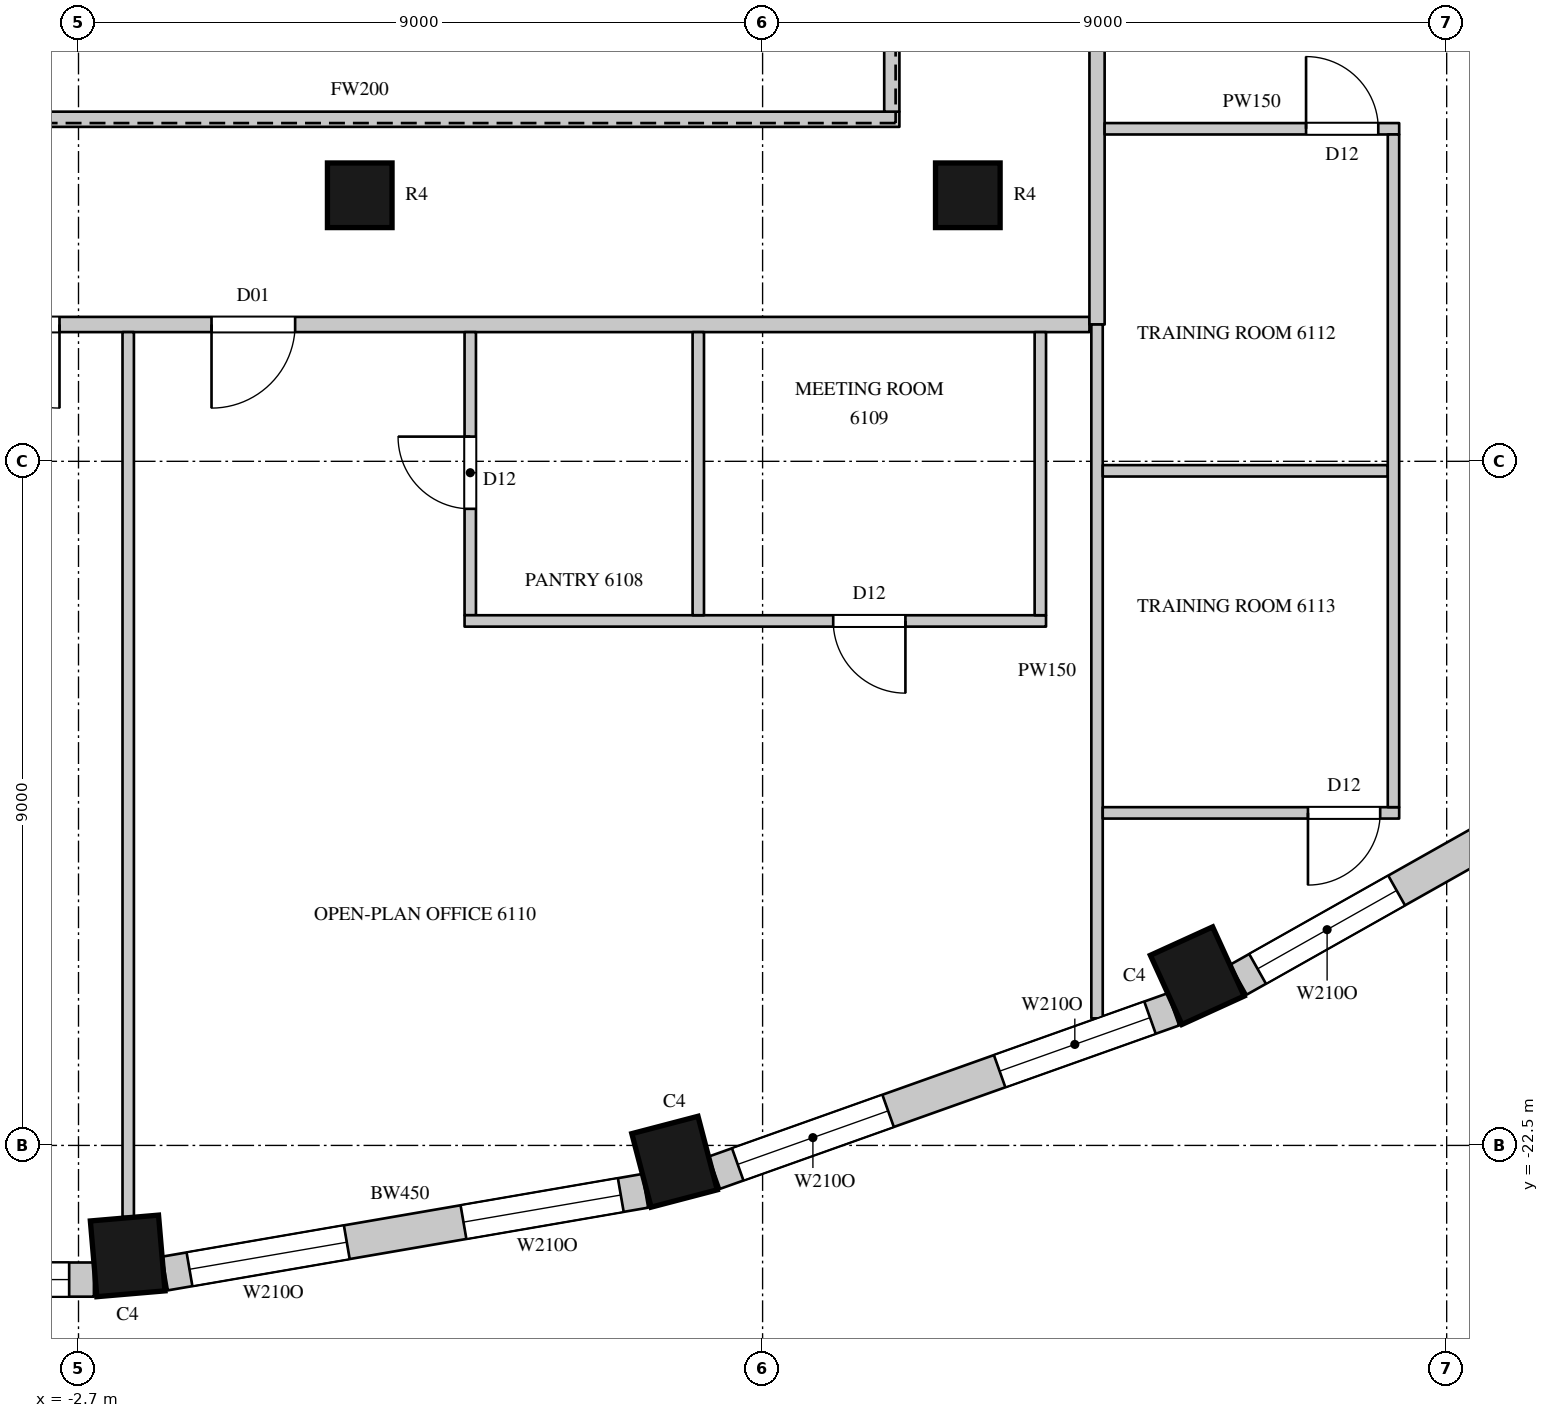
"""IFC4 building model, lengths in metres.
Left out: names, types, materials, properties, quantities, classifications, styles, units other than length and angle.
Written with IfcOpenShell. Run it as: python <this file> out.ifc"""

import sys

from ifc_helpers import new_model, si_unit, direction, frame, frame_2d, origin, origin_2d, place, context, subcontext, project, spatial, rectangle, circle, extrude, element, fill, save


model = new_model("IFC4")
c1 = context("Model", 3, precision=1e-05, world=origin(), true_north=direction((0.0, 1.0)))
c2 = subcontext(c1, "Body", "Model", "MODEL_VIEW")
j1 = project(units=[si_unit("LENGTHUNIT", "METRE"), si_unit("PLANEANGLEUNIT", "RADIAN")], contexts=[c1])
p1 = place(None, origin())
s1 = spatial("IfcSite", under=j1, at=p1, CompositionType="ELEMENT")
p2 = place(p1, origin())
s2 = spatial("IfcBuilding", under=s1, at=p2, CompositionType="ELEMENT")
p3 = place(p2, frame((0.0, 0.0, 272.1)))
s3 = spatial("IfcBuildingStorey", under=s2, at=p3, CompositionType="ELEMENT", Elevation=272.1)
for number, where, z_axis, x_axis in (
    (1, (-2.053, -23.954, 0.0), (0.0, 0.0, 1.0), (0.996, 0.085, 0.0)),
    (2, (5.142, -22.715, 0.0), (0.0, 0.0, 1.0), (0.967, 0.253, 0.0)),
    (3, (12.019, -20.267, 0.0), (0.0, 0.0, 1.0), (0.91, 0.415, 0.0)),
):
    element("IfcColumn", number, at=place(p3, frame(where, z_axis=z_axis, x_axis=x_axis)), inside=s3, PredefinedType="COLUMN", context=c2, shape_type="SweptSolid", body=[
        extrude(rectangle(XDim=0.9, YDim=1.0, at=origin_2d()), origin(), (0.0, 0.0, 1.0), 4.1),
    ])
for number, where, z_axis, x_axis in (
    (4, (1.0, -10.0, 0.0), (0.0, 0.0, 1.0), (1.0, 0.0, 0.0)),
    (5, (9.0, -10.0, 0.0), (0.0, 0.0, 1.0), (1.0, 0.0, 0.0)),
):
    element("IfcColumn", number, at=place(p3, frame(where, z_axis=z_axis, x_axis=x_axis)), inside=s3, PredefinedType="COLUMN", context=c2, shape_type="SweptSolid", body=[
        extrude(circle(Radius=0.425, at=origin_2d()), origin(), (0.0, 0.0, 1.0), 4.1),
    ])
p4 = place(p3, frame((-8.903, -24.265, 0.0), z_axis=(0.0, 0.0, 1.0), x_axis=(1.0, 0.0, 0.0)))
e6 = element("IfcWall", 6, at=p4, inside=s3, PredefinedType="SOLIDWALL", context=c2, shape_type="SweptSolid", body=[
    extrude(rectangle(XDim=6.406, YDim=0.45, at=frame_2d((3.203, 0.0))), origin(), (0.0, 0.0, 1.0), 3.8),
])
p5 = place(p4, frame((3.98, 0.0, 1.05)))
e7 = element("IfcOpeningElement", 7, at=p5, cuts=e6, PredefinedType="OPENING", context=c2, shape_type="SweptSolid", body=[
    extrude(rectangle(XDim=2.1, YDim=2.4, at=frame_2d((1.05, 1.2))), frame((0.0, 0.235, 0.0), z_axis=(0.0, -1.0, 0.0), x_axis=(1.0, 0.0, 0.0)), (0.0, 0.0, 1.0), 0.47),
])
p6 = place(p4, frame((1.214, 0.0, 1.05)))
e8 = element("IfcOpeningElement", 8, at=p6, cuts=e6, PredefinedType="OPENING", context=c2, shape_type="SweptSolid", body=[
    extrude(rectangle(XDim=1.2, YDim=2.4, at=frame_2d((0.6, 1.2))), frame((0.0, 0.235, 0.0), z_axis=(0.0, -1.0, 0.0), x_axis=(1.0, 0.0, 0.0)), (0.0, 0.0, 1.0), 0.47),
])
p7 = place(p3, frame((-1.562, -24.185, 0.0), z_axis=(0.0, 0.0, 1.0), x_axis=(0.985502073964, 0.169663379113, 0.0)))
e9 = element("IfcWall", 9, at=p7, inside=s3, PredefinedType="SOLIDWALL", context=c2, shape_type="SweptSolid", body=[
    extrude(rectangle(XDim=6.412, YDim=0.45, at=frame_2d((3.206, 0.0))), origin(), (0.0, 0.0, 1.0), 3.8),
])
p8 = place(p7, frame((0.327, 0.0, 1.05)))
e10 = element("IfcOpeningElement", 10, at=p8, cuts=e9, PredefinedType="OPENING", context=c2, shape_type="SweptSolid", body=[
    extrude(rectangle(XDim=2.1, YDim=2.4, at=frame_2d((1.05, 1.2))), frame((0.0, 0.235, 0.0), z_axis=(0.0, -1.0, 0.0), x_axis=(1.0, 0.0, 0.0)), (0.0, 0.0, 1.0), 0.47),
])
p9 = place(p7, frame((3.985, 0.0, 1.05)))
e11 = element("IfcOpeningElement", 11, at=p9, cuts=e9, PredefinedType="OPENING", context=c2, shape_type="SweptSolid", body=[
    extrude(rectangle(XDim=2.1, YDim=2.4, at=frame_2d((1.05, 1.2))), frame((0.0, 0.235, 0.0), z_axis=(0.0, -1.0, 0.0), x_axis=(1.0, 0.0, 0.0)), (0.0, 0.0, 1.0), 0.47),
])
p10 = place(p3, frame((5.665, -22.859, 0.0), z_axis=(0.0, 0.0, 1.0), x_axis=(0.942108340262, 0.335308626803, 0.0)))
e12 = element("IfcWall", 12, at=p10, inside=s3, PredefinedType="SOLIDWALL", context=c2, shape_type="SweptSolid", body=[
    extrude(rectangle(XDim=6.412, YDim=0.45, at=frame_2d((3.206, 0.0))), origin(), (0.0, 0.0, 1.0), 3.8),
])
p11 = place(p10, frame((0.327, 0.0, 1.05)))
e13 = element("IfcOpeningElement", 13, at=p11, cuts=e12, PredefinedType="OPENING", context=c2, shape_type="SweptSolid", body=[
    extrude(rectangle(XDim=2.1, YDim=2.4, at=frame_2d((1.05, 1.2))), frame((0.0, 0.235, 0.0), z_axis=(0.0, -1.0, 0.0), x_axis=(1.0, 0.0, 0.0)), (0.0, 0.0, 1.0), 0.47),
])
p12 = place(p10, frame((3.985, 0.0, 1.05)))
e14 = element("IfcOpeningElement", 14, at=p12, cuts=e12, PredefinedType="OPENING", context=c2, shape_type="SweptSolid", body=[
    extrude(rectangle(XDim=2.1, YDim=2.4, at=frame_2d((1.05, 1.2))), frame((0.0, 0.235, 0.0), z_axis=(0.0, -1.0, 0.0), x_axis=(1.0, 0.0, 0.0)), (0.0, 0.0, 1.0), 0.47),
])
p13 = place(p3, frame((12.559, -20.32, 0.0), z_axis=(0.0, 0.0, 1.0), x_axis=(0.871065783524, 0.491166367714, 0.0)))
e15 = element("IfcWall", 15, at=p13, inside=s3, PredefinedType="SOLIDWALL", context=c2, shape_type="SweptSolid", body=[
    extrude(rectangle(XDim=6.196, YDim=0.45, at=frame_2d((3.098, 0.0))), origin(), (0.0, 0.0, 1.0), 3.8),
])
p14 = place(p13, frame((0.291, 0.0, 1.05)))
e16 = element("IfcOpeningElement", 16, at=p14, cuts=e15, PredefinedType="OPENING", context=c2, shape_type="SweptSolid", body=[
    extrude(rectangle(XDim=2.1, YDim=2.4, at=frame_2d((1.05, 1.2))), frame((0.0, 0.235, 0.0), z_axis=(0.0, -1.0, 0.0), x_axis=(1.0, 0.0, 0.0)), (0.0, 0.0, 1.0), 0.47),
])
p15 = place(p13, frame((3.875, 0.0, 1.05)))
e17 = element("IfcOpeningElement", 17, at=p15, cuts=e15, PredefinedType="OPENING", context=c2, shape_type="SweptSolid", body=[
    extrude(rectangle(XDim=2.1, YDim=2.4, at=frame_2d((1.05, 1.2))), frame((0.0, 0.235, 0.0), z_axis=(0.0, -1.0, 0.0), x_axis=(1.0, 0.0, 0.0)), (0.0, 0.0, 1.0), 0.47),
])
p16 = place(p3, frame((-10.9, -11.7, 0.0), z_axis=(0.0, 0.0, 1.0), x_axis=(1.0, 0.0, 0.0)))
e18 = element("IfcWall", 18, at=p16, inside=s3, PredefinedType="PARTITIONING", context=c2, shape_type="SweptSolid", body=[
    extrude(rectangle(XDim=21.5, YDim=0.2, at=frame_2d((10.75, 0.0))), origin(), (0.0, 0.0, 1.0), 3.8),
])
p17 = place(p16, frame((0.95, 0.0, 0.0)))
e19 = element("IfcOpeningElement", 19, at=p17, cuts=e18, PredefinedType="OPENING", context=c2, shape_type="SweptSolid", body=[
    extrude(rectangle(XDim=0.95, YDim=2.2, at=frame_2d((0.475, 1.1))), frame((0.0, 0.11, 0.0), z_axis=(0.0, -1.0, 0.0), x_axis=(1.0, 0.0, 0.0)), (0.0, 0.0, 1.0), 0.22),
])
p18 = place(p16, frame((4.2, 0.0, 0.0)))
e20 = element("IfcOpeningElement", 20, at=p18, cuts=e18, PredefinedType="OPENING", context=c2, shape_type="SweptSolid", body=[
    extrude(rectangle(XDim=0.9, YDim=2.2, at=frame_2d((0.45, 1.1))), frame((0.0, 0.11, 0.0), z_axis=(0.0, -1.0, 0.0), x_axis=(1.0, 0.0, 0.0)), (0.0, 0.0, 1.0), 0.22),
])
p19 = place(p16, frame((6.85, 0.0, 0.0)))
e21 = element("IfcOpeningElement", 21, at=p19, cuts=e18, PredefinedType="OPENING", context=c2, shape_type="SweptSolid", body=[
    extrude(rectangle(XDim=1.1, YDim=2.4, at=frame_2d((0.55, 1.2))), frame((0.0, 0.11, 0.0), z_axis=(0.0, -1.0, 0.0), x_axis=(1.0, 0.0, 0.0)), (0.0, 0.0, 1.0), 0.22),
])
p20 = place(p16, frame((9.95, 0.0, 0.0)))
e22 = element("IfcOpeningElement", 22, at=p20, cuts=e18, PredefinedType="OPENING", context=c2, shape_type="SweptSolid", body=[
    extrude(rectangle(XDim=1.1, YDim=2.4, at=frame_2d((0.55, 1.2))), frame((0.0, 0.11, 0.0), z_axis=(0.0, -1.0, 0.0), x_axis=(1.0, 0.0, 0.0)), (0.0, 0.0, 1.0), 0.22),
])
p21 = place(p3, frame((-6.1, -9.0, 0.0), z_axis=(0.0, 0.0, 1.0), x_axis=(1.0, 0.0, 0.0)))
e23 = element("IfcWall", 23, at=p21, inside=s3, PredefinedType="PARTITIONING", context=c2, shape_type="SweptSolid", body=[
    extrude(rectangle(XDim=14.2, YDim=0.2, at=frame_2d((7.1, 0.0))), origin(), (0.0, 0.0, 1.0), 3.8),
])
p22 = place(p3, frame((8.0, -8.9, 0.0), z_axis=(0.0, 0.0, 1.0), x_axis=(0.0, 1.0, 0.0)))
e24 = element("IfcWall", 24, at=p22, inside=s3, PredefinedType="PARTITIONING", context=c2, shape_type="SweptSolid", body=[
    extrude(rectangle(XDim=4.38, YDim=0.2, at=frame_2d((2.19, 0.0))), origin(), (0.0, 0.0, 1.0), 3.8),
])
p23 = place(p3, frame((10.7, -11.7, 0.0), z_axis=(0.0, 0.0, 1.0), x_axis=(0.0, 1.0, 0.0)))
e25 = element("IfcWall", 25, at=p23, inside=s3, PredefinedType="PARTITIONING", context=c2, shape_type="SweptSolid", body=[
    extrude(rectangle(XDim=23.8, YDim=0.2, at=frame_2d((11.9, 0.0))), origin(), (0.0, 0.0, 1.0), 3.8),
])
p24 = place(p23, frame((12.35, 0.0, 0.0)))
e26 = element("IfcOpeningElement", 26, at=p24, cuts=e25, PredefinedType="OPENING", context=c2, shape_type="SweptSolid", body=[
    extrude(rectangle(XDim=1.5, YDim=2.4, at=frame_2d((0.75, 1.2))), frame((0.0, 0.11, 0.0), z_axis=(0.0, -1.0, 0.0), x_axis=(1.0, 0.0, 0.0)), (0.0, 0.0, 1.0), 0.22),
])
p25 = place(p23, frame((19.55, 0.0, 0.0)))
e27 = element("IfcOpeningElement", 27, at=p25, cuts=e25, PredefinedType="OPENING", context=c2, shape_type="SweptSolid", body=[
    extrude(rectangle(XDim=1.1, YDim=2.4, at=frame_2d((0.55, 1.2))), frame((0.0, 0.11, 0.0), z_axis=(0.0, -1.0, 0.0), x_axis=(1.0, 0.0, 0.0)), (0.0, 0.0, 1.0), 0.22),
])
p26 = place(p23, frame((4.25, 0.0, 0.0)))
e28 = element("IfcOpeningElement", 28, at=p26, cuts=e25, PredefinedType="OPENING", context=c2, shape_type="SweptSolid", body=[
    extrude(rectangle(XDim=1.1, YDim=2.4, at=frame_2d((0.55, 1.2))), frame((0.0, 0.11, 0.0), z_axis=(0.0, -1.0, 0.0), x_axis=(1.0, 0.0, 0.0)), (0.0, 0.0, 1.0), 0.22),
])
p27 = place(p3, frame((-2.046, -23.441, 0.0), z_axis=(0.0, 0.0, 1.0), x_axis=(0.0, 1.0, 0.0)))
e29 = element("IfcWall", 29, at=p27, inside=s3, PredefinedType="PARTITIONING", context=c2, shape_type="SweptSolid", body=[
    extrude(rectangle(XDim=11.641, YDim=0.15, at=frame_2d((5.821, 0.0))), origin(), (0.0, 0.0, 1.0), 3.8),
])
p28 = place(p3, frame((2.454, -15.525, 0.0), z_axis=(0.0, 0.0, 1.0), x_axis=(0.0, 1.0, 0.0)))
e30 = element("IfcWall", 30, at=p28, inside=s3, PredefinedType="PARTITIONING", context=c2, shape_type="SweptSolid", body=[
    extrude(rectangle(XDim=3.725, YDim=0.15, at=frame_2d((1.862, 0.0))), origin(), (0.0, 0.0, 1.0), 3.8),
])
p29 = place(p28, frame((1.4, 0.0, 0.0)))
e31 = element("IfcOpeningElement", 31, at=p29, cuts=e30, PredefinedType="OPENING", context=c2, shape_type="SweptSolid", body=[
    extrude(rectangle(XDim=0.95, YDim=2.2, at=frame_2d((0.475, 1.1))), frame((0.0, 0.085, 0.0), z_axis=(0.0, -1.0, 0.0), x_axis=(1.0, 0.0, 0.0)), (0.0, 0.0, 1.0), 0.17),
])
p30 = place(p3, frame((2.379, -15.6, 0.0), z_axis=(0.0, 0.0, 1.0), x_axis=(1.0, 0.0, 0.0)))
e32 = element("IfcWall", 32, at=p30, inside=s3, PredefinedType="PARTITIONING", context=c2, shape_type="SweptSolid", body=[
    extrude(rectangle(XDim=7.65, YDim=0.15, at=frame_2d((3.825, 0.0))), origin(), (0.0, 0.0, 1.0), 3.8),
])
p31 = place(p30, frame((4.85, 0.0, 0.0)))
e33 = element("IfcOpeningElement", 33, at=p31, cuts=e32, PredefinedType="OPENING", context=c2, shape_type="SweptSolid", body=[
    extrude(rectangle(XDim=0.95, YDim=2.2, at=frame_2d((0.475, 1.1))), frame((0.0, 0.085, 0.0), z_axis=(0.0, -1.0, 0.0), x_axis=(1.0, 0.0, 0.0)), (0.0, 0.0, 1.0), 0.17),
])
for number, where, z_axis, x_axis in (
    (34, (5.454, -15.525, 0.0), (0.0, 0.0, 1.0), (0.0, 1.0, 0.0)),
    (35, (9.954, -15.525, 0.0), (0.0, 0.0, 1.0), (0.0, 1.0, 0.0)),
):
    element("IfcWall", number, at=place(p3, frame(where, z_axis=z_axis, x_axis=x_axis)), inside=s3, PredefinedType="PARTITIONING", context=c2, shape_type="SweptSolid", body=[
        extrude(rectangle(XDim=3.725, YDim=0.15, at=frame_2d((1.862, 0.0))), origin(), (0.0, 0.0, 1.0), 3.8),
    ])
p32 = place(p3, frame((10.7, -20.828, 0.0), z_axis=(0.0, 0.0, 1.0), x_axis=(0.0, 1.0, 0.0)))
e36 = element("IfcWall", 36, at=p32, inside=s3, PredefinedType="PARTITIONING", context=c2, shape_type="SweptSolid", body=[
    extrude(rectangle(XDim=9.128, YDim=0.15, at=frame_2d((4.564, 0.0))), origin(), (0.0, 0.0, 1.0), 3.8),
])
p33 = place(p3, frame((10.775, -18.125, 0.0), z_axis=(0.0, 0.0, 1.0), x_axis=(1.0, 0.0, 0.0)))
e37 = element("IfcWall", 37, at=p33, inside=s3, PredefinedType="PARTITIONING", context=c2, shape_type="SweptSolid", body=[
    extrude(rectangle(XDim=3.9, YDim=0.15, at=frame_2d((1.95, 0.0))), origin(), (0.0, 0.0, 1.0), 3.8),
])
p34 = place(p33, frame((2.7, 0.0, 0.0)))
e38 = element("IfcOpeningElement", 38, at=p34, cuts=e37, PredefinedType="OPENING", context=c2, shape_type="SweptSolid", body=[
    extrude(rectangle(XDim=0.95, YDim=2.2, at=frame_2d((0.475, 1.1))), frame((0.0, 0.085, 0.0), z_axis=(0.0, -1.0, 0.0), x_axis=(1.0, 0.0, 0.0)), (0.0, 0.0, 1.0), 0.17),
])
p35 = place(p3, frame((10.775, -13.625, 0.0), z_axis=(0.0, 0.0, 1.0), x_axis=(1.0, 0.0, 0.0)))
e39 = element("IfcWall", 39, at=p35, inside=s3, PredefinedType="PARTITIONING", context=c2, shape_type="SweptSolid", body=[
    extrude(rectangle(XDim=3.75, YDim=0.15, at=frame_2d((1.875, 0.0))), origin(), (0.0, 0.0, 1.0), 3.8),
])
p36 = place(p3, frame((10.8, -9.125, 0.0), z_axis=(0.0, 0.0, 1.0), x_axis=(1.0, 0.0, 0.0)))
e40 = element("IfcWall", 40, at=p36, inside=s3, PredefinedType="PARTITIONING", context=c2, shape_type="SweptSolid", body=[
    extrude(rectangle(XDim=3.875, YDim=0.15, at=frame_2d((1.938, 0.0))), origin(), (0.0, 0.0, 1.0), 3.8),
])
p37 = place(p36, frame((2.65, 0.0, 0.0)))
e41 = element("IfcOpeningElement", 41, at=p37, cuts=e40, PredefinedType="OPENING", context=c2, shape_type="SweptSolid", body=[
    extrude(rectangle(XDim=0.95, YDim=2.2, at=frame_2d((0.475, 1.1))), frame((0.0, 0.085, 0.0), z_axis=(0.0, -1.0, 0.0), x_axis=(1.0, 0.0, 0.0)), (0.0, 0.0, 1.0), 0.17),
])
p38 = place(p3, frame((14.6, -18.05, 0.0), z_axis=(0.0, 0.0, 1.0), x_axis=(0.0, 1.0, 0.0)))
e42 = element("IfcWall", 42, at=p38, inside=s3, PredefinedType="PARTITIONING", context=c2, shape_type="SweptSolid", body=[
    extrude(rectangle(XDim=8.85, YDim=0.15, at=frame_2d((4.425, 0.0))), origin(), (0.0, 0.0, 1.0), 3.8),
])
p39 = place(p5, origin())
e43 = element("IfcWindow", 43, at=p39, inside=s3, PartitioningType="SINGLE_PANEL", PredefinedType="WINDOW", context=c2, shape_type="SweptSolid", body=[
    extrude(rectangle(XDim=2.1, YDim=2.4, at=frame_2d((1.05, 1.2))), frame((0.0, 0.135, 0.0), z_axis=(0.0, -1.0, 0.0), x_axis=(1.0, 0.0, 0.0)), (0.0, 0.0, 1.0), 0.06),
])
fill(e7, e43)
p40 = place(p8, origin())
e44 = element("IfcWindow", 44, at=p40, inside=s3, PartitioningType="SINGLE_PANEL", PredefinedType="WINDOW", context=c2, shape_type="SweptSolid", body=[
    extrude(rectangle(XDim=2.1, YDim=2.4, at=frame_2d((1.05, 1.2))), frame((0.0, 0.135, 0.0), z_axis=(0.0, -1.0, 0.0), x_axis=(1.0, 0.0, 0.0)), (0.0, 0.0, 1.0), 0.06),
])
fill(e10, e44)
p41 = place(p9, origin())
e45 = element("IfcWindow", 45, at=p41, inside=s3, PartitioningType="SINGLE_PANEL", PredefinedType="WINDOW", context=c2, shape_type="SweptSolid", body=[
    extrude(rectangle(XDim=2.1, YDim=2.4, at=frame_2d((1.05, 1.2))), frame((0.0, 0.135, 0.0), z_axis=(0.0, -1.0, 0.0), x_axis=(1.0, 0.0, 0.0)), (0.0, 0.0, 1.0), 0.06),
])
fill(e11, e45)
p42 = place(p11, origin())
e46 = element("IfcWindow", 46, at=p42, inside=s3, PartitioningType="SINGLE_PANEL", PredefinedType="WINDOW", context=c2, shape_type="SweptSolid", body=[
    extrude(rectangle(XDim=2.1, YDim=2.4, at=frame_2d((1.05, 1.2))), frame((0.0, 0.135, 0.0), z_axis=(0.0, -1.0, 0.0), x_axis=(1.0, 0.0, 0.0)), (0.0, 0.0, 1.0), 0.06),
])
fill(e13, e46)
p43 = place(p12, origin())
e47 = element("IfcWindow", 47, at=p43, inside=s3, PartitioningType="SINGLE_PANEL", PredefinedType="WINDOW", context=c2, shape_type="SweptSolid", body=[
    extrude(rectangle(XDim=2.1, YDim=2.4, at=frame_2d((1.05, 1.2))), frame((0.0, 0.135, 0.0), z_axis=(0.0, -1.0, 0.0), x_axis=(1.0, 0.0, 0.0)), (0.0, 0.0, 1.0), 0.06),
])
fill(e14, e47)
p44 = place(p14, origin())
e48 = element("IfcWindow", 48, at=p44, inside=s3, PartitioningType="SINGLE_PANEL", PredefinedType="WINDOW", context=c2, shape_type="SweptSolid", body=[
    extrude(rectangle(XDim=2.1, YDim=2.4, at=frame_2d((1.05, 1.2))), frame((0.0, 0.135, 0.0), z_axis=(0.0, -1.0, 0.0), x_axis=(1.0, 0.0, 0.0)), (0.0, 0.0, 1.0), 0.06),
])
fill(e16, e48)
p45 = place(p19, origin())
e49 = element("IfcDoor", 49, at=p45, inside=s3, OperationType="SINGLE_SWING_LEFT", PredefinedType="DOOR", context=c2, shape_type="SweptSolid", body=[
    extrude(rectangle(XDim=1.1, YDim=2.4, at=frame_2d((0.55, 1.2))), frame((0.0, 0.025, 0.0), z_axis=(0.0, -1.0, 0.0), x_axis=(1.0, 0.0, 0.0)), (0.0, 0.0, 1.0), 0.05),
])
fill(e21, e49)
p46 = place(p20, origin())
e50 = element("IfcDoor", 50, at=p46, inside=s3, OperationType="SINGLE_SWING_RIGHT", PredefinedType="DOOR", context=c2, shape_type="SweptSolid", body=[
    extrude(rectangle(XDim=1.1, YDim=2.4, at=frame_2d((0.55, 1.2))), frame((0.0, 0.025, 0.0), z_axis=(0.0, -1.0, 0.0), x_axis=(1.0, 0.0, 0.0)), (0.0, 0.0, 1.0), 0.05),
])
fill(e22, e50)
p47 = place(p29, origin())
e51 = element("IfcDoor", 51, at=p47, inside=s3, OperationType="SINGLE_SWING_RIGHT", PredefinedType="DOOR", context=c2, shape_type="SweptSolid", body=[
    extrude(rectangle(XDim=0.95, YDim=2.2, at=frame_2d((0.475, 1.1))), frame((0.0, 0.025, 0.0), z_axis=(0.0, -1.0, 0.0), x_axis=(1.0, 0.0, 0.0)), (0.0, 0.0, 1.0), 0.05),
])
fill(e31, e51)
p48 = place(p31, origin())
e52 = element("IfcDoor", 52, at=p48, inside=s3, OperationType="SINGLE_SWING_LEFT", PredefinedType="DOOR", context=c2, shape_type="SweptSolid", body=[
    extrude(rectangle(XDim=0.95, YDim=2.2, at=frame_2d((0.475, 1.1))), frame((0.0, 0.025, 0.0), z_axis=(0.0, -1.0, 0.0), x_axis=(1.0, 0.0, 0.0)), (0.0, 0.0, 1.0), 0.05),
])
fill(e33, e52)
p49 = place(p37, origin())
e53 = element("IfcDoor", 53, at=p49, inside=s3, OperationType="SINGLE_SWING_LEFT", PredefinedType="DOOR", context=c2, shape_type="SweptSolid", body=[
    extrude(rectangle(XDim=0.95, YDim=2.2, at=frame_2d((0.475, 1.1))), frame((0.0, 0.025, 0.0), z_axis=(0.0, -1.0, 0.0), x_axis=(1.0, 0.0, 0.0)), (0.0, 0.0, 1.0), 0.05),
])
fill(e41, e53)
p50 = place(p34, origin())
e54 = element("IfcDoor", 54, at=p50, inside=s3, OperationType="SINGLE_SWING_RIGHT", PredefinedType="DOOR", context=c2, shape_type="SweptSolid", body=[
    extrude(rectangle(XDim=0.95, YDim=2.2, at=frame_2d((0.475, 1.1))), frame((0.0, 0.025, 0.0), z_axis=(0.0, -1.0, 0.0), x_axis=(1.0, 0.0, 0.0)), (0.0, 0.0, 1.0), 0.05),
])
fill(e38, e54)
save(model, sys.argv[1])
